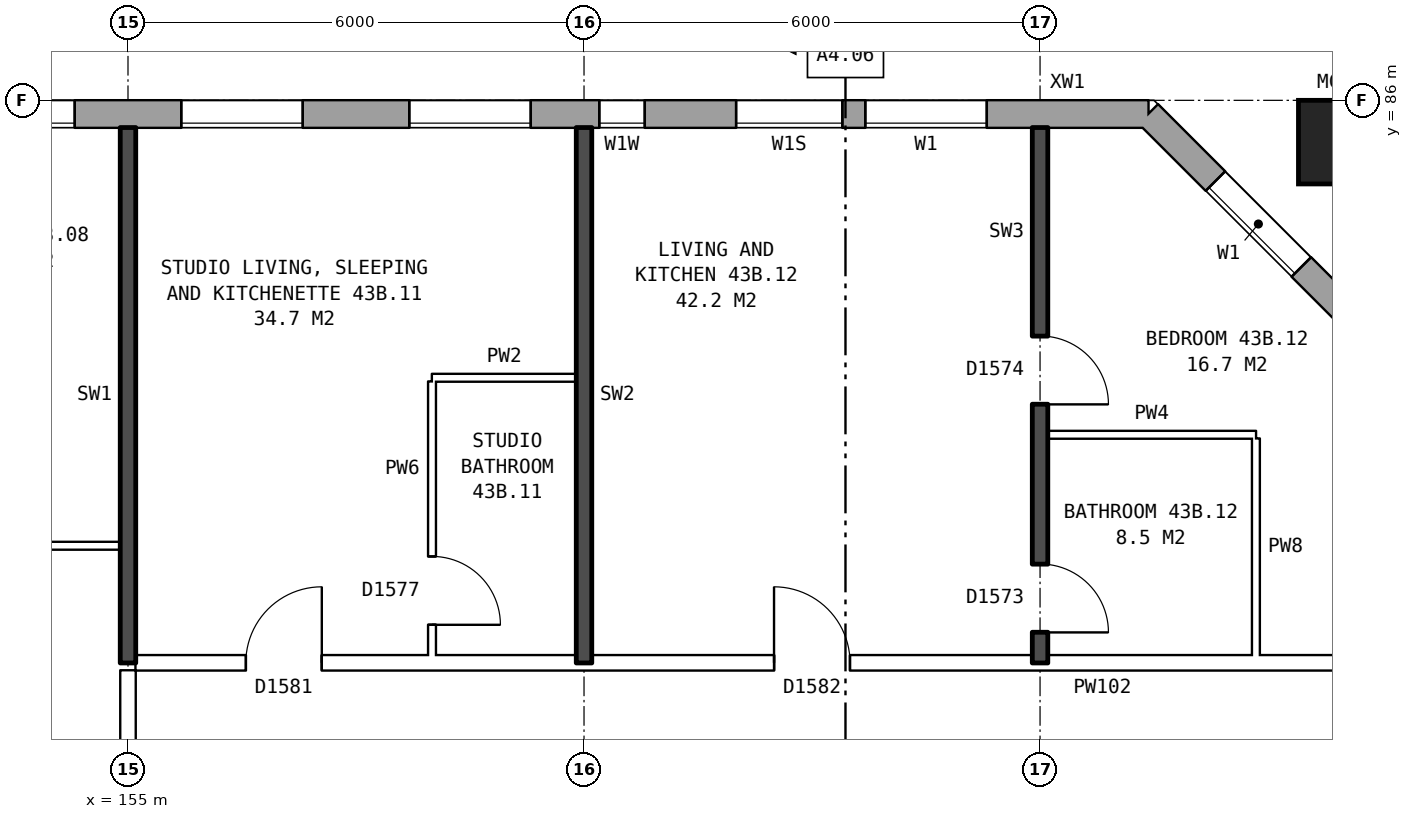
"""IFC4 building model, lengths in metres.
Left out: names, types, materials, properties, quantities, classifications, styles, units other than length and angle.
Written with IfcOpenShell. Run it as: python <this file> out.ifc"""

import sys

from ifc_helpers import new_model, si_unit, direction, frame, frame_2d, origin, origin_2d, place, context, subcontext, project, spatial, rectangle, hollow_rectangle, extrude, element, fill, save


model = new_model("IFC4")
c1 = context("Model", 3, precision=1e-05, world=origin(), true_north=direction((0.0, 1.0)))
c2 = subcontext(c1, "Body", "Model", "MODEL_VIEW")
j1 = project(units=[si_unit("LENGTHUNIT", "METRE"), si_unit("PLANEANGLEUNIT", "RADIAN")], contexts=[c1])
p1 = place(None, origin())
s1 = spatial("IfcSite", under=j1, at=p1, CompositionType="ELEMENT")
p2 = place(p1, origin())
s2 = spatial("IfcBuilding", under=s1, at=p2, CompositionType="ELEMENT")
p3 = place(p2, frame((0.0, 0.0, 154.7)))
s3 = spatial("IfcBuildingStorey", under=s2, at=p3, CompositionType="ELEMENT", Elevation=154.7)
p4 = place(p3, frame((170.95, 85.45, 0.0), z_axis=(0.0, 0.0, 1.0), x_axis=(1.0, 0.0, 0.0)))
e1 = element("IfcColumn", 1, at=p4, inside=s3, PredefinedType="COLUMN", context=c2, shape_type="SweptSolid", body=[
    extrude(hollow_rectangle(XDim=1.1, YDim=1.1, WallThickness=0.06, at=origin_2d()), origin(), (0.0, 0.0, 1.0), 3.1),
])
p5 = place(p3, frame((171.32, 82.925, 0.0), z_axis=(0.0, 0.0, 1.0), x_axis=(-0.707106781187, 0.707106781187, 0.0)))
e2 = element("IfcWall", 2, at=p5, inside=s3, PredefinedType="STANDARD", context=c2, shape_type="SweptSolid", body=[
    extrude(rectangle(XDim=4.094, YDim=0.36, at=frame_2d((2.047, 0.0))), origin(), (0.0, 0.0, 1.0), 2.85),
])
p6 = place(p5, frame((1.247, 0.0, 0.8)))
e3 = element("IfcOpeningElement", 3, at=p6, cuts=e2, PredefinedType="OPENING", context=c2, shape_type="SweptSolid", body=[
    extrude(rectangle(XDim=1.6, YDim=1.8, at=frame_2d((0.8, 0.9))), frame((0.0, 0.19, 0.0), z_axis=(0.0, -1.0, 0.0), x_axis=(1.0, 0.0, 0.0)), (0.0, 0.0, 1.0), 0.38),
])
p7 = place(p3, frame((168.425, 85.82, 0.0), z_axis=(0.0, 0.0, 1.0), x_axis=(-1.0, 0.0, 0.0)))
e4 = element("IfcWall", 4, at=p7, inside=s3, PredefinedType="STANDARD", context=c2, shape_type="SweptSolid", body=[
    extrude(rectangle(XDim=34.351, YDim=0.36, at=frame_2d((17.175, 0.0))), origin(), (0.0, 0.0, 1.0), 2.85),
])
p8 = place(p7, frame((2.125, 0.0, 0.8)))
e5 = element("IfcOpeningElement", 5, at=p8, cuts=e4, PredefinedType="OPENING", context=c2, shape_type="SweptSolid", body=[
    extrude(rectangle(XDim=1.6, YDim=1.8, at=frame_2d((0.8, 0.9))), frame((0.0, 0.19, 0.0), z_axis=(0.0, -1.0, 0.0), x_axis=(1.0, 0.0, 0.0)), (0.0, 0.0, 1.0), 0.38),
])
p9 = place(p7, frame((4.025, 0.0, 1.7)))
e6 = element("IfcOpeningElement", 6, at=p9, cuts=e4, PredefinedType="OPENING", context=c2, shape_type="SweptSolid", body=[
    extrude(rectangle(XDim=1.4, YDim=0.9, at=frame_2d((0.7, 0.45))), frame((0.0, 0.19, 0.0), z_axis=(0.0, -1.0, 0.0), x_axis=(1.0, 0.0, 0.0)), (0.0, 0.0, 1.0), 0.38),
])
p10 = place(p7, frame((8.125, 0.0, 0.8)))
e7 = element("IfcOpeningElement", 7, at=p10, cuts=e4, PredefinedType="OPENING", context=c2, shape_type="SweptSolid", body=[
    extrude(rectangle(XDim=1.6, YDim=1.8, at=frame_2d((0.8, 0.9))), frame((0.0, 0.19, 0.0), z_axis=(0.0, -1.0, 0.0), x_axis=(1.0, 0.0, 0.0)), (0.0, 0.0, 1.0), 0.38),
])
p11 = place(p7, frame((11.125, 0.0, 0.8)))
e8 = element("IfcOpeningElement", 8, at=p11, cuts=e4, PredefinedType="OPENING", context=c2, shape_type="SweptSolid", body=[
    extrude(rectangle(XDim=1.6, YDim=1.8, at=frame_2d((0.8, 0.9))), frame((0.0, 0.19, 0.0), z_axis=(0.0, -1.0, 0.0), x_axis=(1.0, 0.0, 0.0)), (0.0, 0.0, 1.0), 0.38),
])
p12 = place(p7, frame((14.125, 0.0, 0.8)))
e9 = element("IfcOpeningElement", 9, at=p12, cuts=e4, PredefinedType="OPENING", context=c2, shape_type="SweptSolid", body=[
    extrude(rectangle(XDim=1.6, YDim=1.8, at=frame_2d((0.8, 0.9))), frame((0.0, 0.19, 0.0), z_axis=(0.0, -1.0, 0.0), x_axis=(1.0, 0.0, 0.0)), (0.0, 0.0, 1.0), 0.38),
])
p13 = place(p7, frame((17.125, 0.0, 0.8)))
e10 = element("IfcOpeningElement", 10, at=p13, cuts=e4, PredefinedType="OPENING", context=c2, shape_type="SweptSolid", body=[
    extrude(rectangle(XDim=1.6, YDim=1.8, at=frame_2d((0.8, 0.9))), frame((0.0, 0.19, 0.0), z_axis=(0.0, -1.0, 0.0), x_axis=(1.0, 0.0, 0.0)), (0.0, 0.0, 1.0), 0.38),
])
p14 = place(p7, frame((20.125, 0.0, 0.8)))
e11 = element("IfcOpeningElement", 11, at=p14, cuts=e4, PredefinedType="OPENING", context=c2, shape_type="SweptSolid", body=[
    extrude(rectangle(XDim=1.6, YDim=1.8, at=frame_2d((0.8, 0.9))), frame((0.0, 0.19, 0.0), z_axis=(0.0, -1.0, 0.0), x_axis=(1.0, 0.0, 0.0)), (0.0, 0.0, 1.0), 0.38),
])
p15 = place(p7, frame((23.125, 0.0, 0.8)))
e12 = element("IfcOpeningElement", 12, at=p15, cuts=e4, PredefinedType="OPENING", context=c2, shape_type="SweptSolid", body=[
    extrude(rectangle(XDim=1.6, YDim=1.8, at=frame_2d((0.8, 0.9))), frame((0.0, 0.19, 0.0), z_axis=(0.0, -1.0, 0.0), x_axis=(1.0, 0.0, 0.0)), (0.0, 0.0, 1.0), 0.38),
])
p16 = place(p7, frame((25.625, 0.0, 0.8)))
e13 = element("IfcOpeningElement", 13, at=p16, cuts=e4, PredefinedType="OPENING", context=c2, shape_type="SweptSolid", body=[
    extrude(rectangle(XDim=1.0, YDim=1.8, at=frame_2d((0.5, 0.9))), frame((0.0, 0.19, 0.0), z_axis=(0.0, -1.0, 0.0), x_axis=(1.0, 0.0, 0.0)), (0.0, 0.0, 1.0), 0.38),
])
p17 = place(p7, frame((26.925, 0.0, 0.8)))
e14 = element("IfcOpeningElement", 14, at=p17, cuts=e4, PredefinedType="OPENING", context=c2, shape_type="SweptSolid", body=[
    extrude(rectangle(XDim=0.8, YDim=0.9, at=frame_2d((0.4, 0.45))), frame((0.0, 0.19, 0.0), z_axis=(0.0, -1.0, 0.0), x_axis=(1.0, 0.0, 0.0)), (0.0, 0.0, 1.0), 0.38),
])
p18 = place(p7, frame((32.125, 0.0, 0.8)))
e15 = element("IfcOpeningElement", 15, at=p18, cuts=e4, PredefinedType="OPENING", context=c2, shape_type="SweptSolid", body=[
    extrude(rectangle(XDim=1.6, YDim=1.8, at=frame_2d((0.8, 0.9))), frame((0.0, 0.19, 0.0), z_axis=(0.0, -1.0, 0.0), x_axis=(1.0, 0.0, 0.0)), (0.0, 0.0, 1.0), 0.38),
])
p19 = place(p7, frame((6.625, 0.0, 0.8)))
e16 = element("IfcOpeningElement", 16, at=p19, cuts=e4, PredefinedType="OPENING", context=c2, shape_type="SweptSolid", body=[
    extrude(rectangle(XDim=0.6, YDim=0.9, at=frame_2d((0.3, 0.45))), frame((0.0, 0.19, 0.0), z_axis=(0.0, -1.0, 0.0), x_axis=(1.0, 0.0, 0.0)), (0.0, 0.0, 1.0), 0.38),
])
p20 = place(p7, frame((28.925, 0.0, 1.7)))
e17 = element("IfcOpeningElement", 17, at=p20, cuts=e4, PredefinedType="OPENING", context=c2, shape_type="SweptSolid", body=[
    extrude(rectangle(XDim=0.8, YDim=0.9, at=frame_2d((0.4, 0.45))), frame((0.0, 0.19, 0.0), z_axis=(0.0, -1.0, 0.0), x_axis=(1.0, 0.0, 0.0)), (0.0, 0.0, 1.0), 0.38),
])
p21 = place(p7, frame((30.025, 0.0, 0.8)))
e18 = element("IfcOpeningElement", 18, at=p21, cuts=e4, PredefinedType="OPENING", context=c2, shape_type="SweptSolid", body=[
    extrude(rectangle(XDim=1.2, YDim=1.8, at=frame_2d((0.6, 0.9))), frame((0.0, 0.19, 0.0), z_axis=(0.0, -1.0, 0.0), x_axis=(1.0, 0.0, 0.0)), (0.0, 0.0, 1.0), 0.38),
])
p22 = place(p3, frame((155.1, 78.6, 0.0), z_axis=(0.0, 0.0, 1.0), x_axis=(1.0, 0.0, 0.0)))
e19 = element("IfcWall", 19, at=p22, inside=s3, PredefinedType="PARTITIONING", context=c2, shape_type="SweptSolid", body=[
    extrude(rectangle(XDim=16.04, YDim=0.2, at=frame_2d((8.02, 0.0))), origin(), (0.0, 0.0, 1.0), 2.85),
])
p23 = place(p22, frame((1.45, 0.0, 0.0)))
e20 = element("IfcOpeningElement", 20, at=p23, cuts=e19, PredefinedType="OPENING", context=c2, shape_type="SweptSolid", body=[
    extrude(rectangle(XDim=1.0, YDim=2.1, at=frame_2d((0.5, 1.05))), frame((0.0, 0.11, 0.0), z_axis=(0.0, -1.0, 0.0), x_axis=(1.0, 0.0, 0.0)), (0.0, 0.0, 1.0), 0.22),
])
p24 = place(p22, frame((8.4, 0.0, 0.0)))
e21 = element("IfcOpeningElement", 21, at=p24, cuts=e19, PredefinedType="OPENING", context=c2, shape_type="SweptSolid", body=[
    extrude(rectangle(XDim=1.0, YDim=2.1, at=frame_2d((0.5, 1.05))), frame((0.0, 0.11, 0.0), z_axis=(0.0, -1.0, 0.0), x_axis=(1.0, 0.0, 0.0)), (0.0, 0.0, 1.0), 0.22),
])
p25 = place(p3, frame((152.0, 80.14, 0.0), z_axis=(0.0, 0.0, 1.0), x_axis=(1.0, 0.0, 0.0)))
e22 = element("IfcWall", 22, at=p25, inside=s3, PredefinedType="PARTITIONING", context=c2, shape_type="SweptSolid", body=[
    extrude(rectangle(XDim=2.9, YDim=0.1, at=frame_2d((1.45, 0.0))), origin(), (0.0, 0.0, 1.0), 2.85),
])
p26 = place(p25, frame((1.0, 0.0, 0.0)))
e23 = element("IfcOpeningElement", 23, at=p26, cuts=e22, PredefinedType="OPENING", context=c2, shape_type="SweptSolid", body=[
    extrude(rectangle(XDim=0.9, YDim=2.1, at=frame_2d((0.45, 1.05))), frame((0.0, 0.06, 0.0), z_axis=(0.0, -1.0, 0.0), x_axis=(1.0, 0.0, 0.0)), (0.0, 0.0, 1.0), 0.12),
])
p27 = place(p3, frame((167.1, 81.6, 0.0), z_axis=(0.0, 0.0, 1.0), x_axis=(1.0, 0.0, 0.0)))
e24 = element("IfcWall", 24, at=p27, inside=s3, PredefinedType="PARTITIONING", context=c2, shape_type="SweptSolid", body=[
    extrude(rectangle(XDim=2.74, YDim=0.1, at=frame_2d((1.37, 0.0))), origin(), (0.0, 0.0, 1.0), 2.85),
])
p28 = place(p3, frame((159.0, 82.35, 0.0), z_axis=(0.0, 0.0, 1.0), x_axis=(1.0, 0.0, 0.0)))
e25 = element("IfcWall", 25, at=p28, inside=s3, PredefinedType="PARTITIONING", context=c2, shape_type="SweptSolid", body=[
    extrude(rectangle(XDim=1.9, YDim=0.1, at=frame_2d((0.95, 0.0))), origin(), (0.0, 0.0, 1.0), 2.85),
])
p29 = place(p3, frame((155.0, 76.3, 0.0), z_axis=(0.0, 0.0, 1.0), x_axis=(0.0, 1.0, 0.0)))
e26 = element("IfcWall", 26, at=p29, inside=s3, PredefinedType="PARTITIONING", context=c2, shape_type="SweptSolid", body=[
    extrude(rectangle(XDim=2.2, YDim=0.2, at=frame_2d((1.1, 0.0))), origin(), (0.0, 0.0, 1.0), 2.85),
])
p30 = place(p3, frame((155.0, 78.6, 0.0), z_axis=(0.0, 0.0, 1.0), x_axis=(0.0, 1.0, 0.0)))
e27 = element("IfcWall", 27, at=p30, inside=s3, PredefinedType="SOLIDWALL", context=c2, shape_type="SweptSolid", body=[
    extrude(rectangle(XDim=7.04, YDim=0.2, at=frame_2d((3.52, 0.0))), origin(), (0.0, 0.0, 1.0), 2.85),
])
p31 = place(p3, frame((159.0, 78.7, 0.0), z_axis=(0.0, 0.0, 1.0), x_axis=(0.0, 1.0, 0.0)))
e28 = element("IfcWall", 28, at=p31, inside=s3, PredefinedType="PARTITIONING", context=c2, shape_type="SweptSolid", body=[
    extrude(rectangle(XDim=3.6, YDim=0.1, at=frame_2d((1.8, 0.0))), origin(), (0.0, 0.0, 1.0), 2.85),
])
p32 = place(p31, frame((0.4, 0.0, 0.0)))
e29 = element("IfcOpeningElement", 29, at=p32, cuts=e28, PredefinedType="OPENING", context=c2, shape_type="SweptSolid", body=[
    extrude(rectangle(XDim=0.9, YDim=2.1, at=frame_2d((0.45, 1.05))), frame((0.0, 0.06, 0.0), z_axis=(0.0, -1.0, 0.0), x_axis=(1.0, 0.0, 0.0)), (0.0, 0.0, 1.0), 0.12),
])
p33 = place(p3, frame((161.0, 78.6, 0.0), z_axis=(0.0, 0.0, 1.0), x_axis=(0.0, 1.0, 0.0)))
e30 = element("IfcWall", 30, at=p33, inside=s3, PredefinedType="SOLIDWALL", context=c2, shape_type="SweptSolid", body=[
    extrude(rectangle(XDim=7.04, YDim=0.2, at=frame_2d((3.52, 0.0))), origin(), (0.0, 0.0, 1.0), 2.85),
])
p34 = place(p3, frame((167.0, 78.6, 0.0), z_axis=(0.0, 0.0, 1.0), x_axis=(0.0, 1.0, 0.0)))
e31 = element("IfcWall", 31, at=p34, inside=s3, PredefinedType="SOLIDWALL", context=c2, shape_type="SweptSolid", body=[
    extrude(rectangle(XDim=7.04, YDim=0.2, at=frame_2d((3.52, 0.0))), origin(), (0.0, 0.0, 1.0), 2.85),
])
p35 = place(p34, frame((3.4, 0.0, 0.0)))
e32 = element("IfcOpeningElement", 32, at=p35, cuts=e31, PredefinedType="OPENING", context=c2, shape_type="SweptSolid", body=[
    extrude(rectangle(XDim=0.9, YDim=2.1, at=frame_2d((0.45, 1.05))), frame((0.0, 0.11, 0.0), z_axis=(0.0, -1.0, 0.0), x_axis=(1.0, 0.0, 0.0)), (0.0, 0.0, 1.0), 0.22),
])
p36 = place(p34, frame((0.4, 0.0, 0.0)))
e33 = element("IfcOpeningElement", 33, at=p36, cuts=e31, PredefinedType="OPENING", context=c2, shape_type="SweptSolid", body=[
    extrude(rectangle(XDim=0.9, YDim=2.1, at=frame_2d((0.45, 1.05))), frame((0.0, 0.11, 0.0), z_axis=(0.0, -1.0, 0.0), x_axis=(1.0, 0.0, 0.0)), (0.0, 0.0, 1.0), 0.22),
])
p37 = place(p3, frame((169.84, 78.7, 0.0), z_axis=(0.0, 0.0, 1.0), x_axis=(0.0, 1.0, 0.0)))
e34 = element("IfcWall", 34, at=p37, inside=s3, PredefinedType="PARTITIONING", context=c2, shape_type="SweptSolid", body=[
    extrude(rectangle(XDim=2.85, YDim=0.1, at=frame_2d((1.425, 0.0))), origin(), (0.0, 0.0, 1.0), 2.85),
])
p38 = place(p6, origin())
e35 = element("IfcWindow", 35, at=p38, inside=s3, PartitioningType="SINGLE_PANEL", PredefinedType="WINDOW", context=c2, shape_type="SweptSolid", body=[
    extrude(rectangle(XDim=1.6, YDim=1.8, at=frame_2d((0.8, 0.9))), frame((0.0, 0.15, 0.0), z_axis=(0.0, -1.0, 0.0), x_axis=(1.0, 0.0, 0.0)), (0.0, 0.0, 1.0), 0.06),
])
fill(e3, e35)
p39 = place(p8, origin())
e36 = element("IfcWindow", 36, at=p39, inside=s3, PartitioningType="SINGLE_PANEL", PredefinedType="WINDOW", context=c2, shape_type="SweptSolid", body=[
    extrude(rectangle(XDim=1.6, YDim=1.8, at=frame_2d((0.8, 0.9))), frame((0.0, 0.15, 0.0), z_axis=(0.0, -1.0, 0.0), x_axis=(1.0, 0.0, 0.0)), (0.0, 0.0, 1.0), 0.06),
])
fill(e5, e36)
p40 = place(p9, origin())
e37 = element("IfcWindow", 37, at=p40, inside=s3, PartitioningType="SINGLE_PANEL", PredefinedType="WINDOW", context=c2, shape_type="SweptSolid", body=[
    extrude(rectangle(XDim=1.4, YDim=0.9, at=frame_2d((0.7, 0.45))), frame((0.0, 0.15, 0.0), z_axis=(0.0, -1.0, 0.0), x_axis=(1.0, 0.0, 0.0)), (0.0, 0.0, 1.0), 0.06),
])
fill(e6, e37)
p41 = place(p10, origin())
e38 = element("IfcWindow", 38, at=p41, inside=s3, PartitioningType="SINGLE_PANEL", PredefinedType="WINDOW", context=c2, shape_type="SweptSolid", body=[
    extrude(rectangle(XDim=1.6, YDim=1.8, at=frame_2d((0.8, 0.9))), frame((0.0, 0.15, 0.0), z_axis=(0.0, -1.0, 0.0), x_axis=(1.0, 0.0, 0.0)), (0.0, 0.0, 1.0), 0.06),
])
fill(e7, e38)
p42 = place(p11, origin())
e39 = element("IfcWindow", 39, at=p42, inside=s3, PartitioningType="SINGLE_PANEL", PredefinedType="WINDOW", context=c2, shape_type="SweptSolid", body=[
    extrude(rectangle(XDim=1.6, YDim=1.8, at=frame_2d((0.8, 0.9))), frame((0.0, 0.15, 0.0), z_axis=(0.0, -1.0, 0.0), x_axis=(1.0, 0.0, 0.0)), (0.0, 0.0, 1.0), 0.06),
])
fill(e8, e39)
p43 = place(p12, origin())
e40 = element("IfcWindow", 40, at=p43, inside=s3, PartitioningType="SINGLE_PANEL", PredefinedType="WINDOW", context=c2, shape_type="SweptSolid", body=[
    extrude(rectangle(XDim=1.6, YDim=1.8, at=frame_2d((0.8, 0.9))), frame((0.0, 0.15, 0.0), z_axis=(0.0, -1.0, 0.0), x_axis=(1.0, 0.0, 0.0)), (0.0, 0.0, 1.0), 0.06),
])
fill(e9, e40)
p44 = place(p23, origin())
e41 = element("IfcDoor", 41, at=p44, inside=s3, OperationType="SINGLE_SWING_RIGHT", PredefinedType="DOOR", context=c2, shape_type="SweptSolid", body=[
    extrude(rectangle(XDim=1.0, YDim=2.1, at=frame_2d((0.5, 1.05))), frame((0.0, 0.025, 0.0), z_axis=(0.0, -1.0, 0.0), x_axis=(1.0, 0.0, 0.0)), (0.0, 0.0, 1.0), 0.05),
])
fill(e20, e41)
p45 = place(p32, frame((0.9, 0.0, 0.0), z_axis=(0.0, 0.0, 1.0), x_axis=(-1.0, 0.0, 0.0)))
e42 = element("IfcDoor", 42, at=p45, inside=s3, OperationType="SINGLE_SWING_RIGHT", PredefinedType="DOOR", context=c2, shape_type="SweptSolid", body=[
    extrude(rectangle(XDim=0.9, YDim=2.1, at=frame_2d((0.45, 1.05))), frame((0.0, 0.025, 0.0), z_axis=(0.0, -1.0, 0.0), x_axis=(1.0, 0.0, 0.0)), (0.0, 0.0, 1.0), 0.05),
])
fill(e29, e42)
p46 = place(p35, frame((0.9, 0.0, 0.0), z_axis=(0.0, 0.0, 1.0), x_axis=(-1.0, 0.0, 0.0)))
e43 = element("IfcDoor", 43, at=p46, inside=s3, OperationType="SINGLE_SWING_RIGHT", PredefinedType="DOOR", context=c2, shape_type="SweptSolid", body=[
    extrude(rectangle(XDim=0.9, YDim=2.1, at=frame_2d((0.45, 1.05))), frame((0.0, 0.025, 0.0), z_axis=(0.0, -1.0, 0.0), x_axis=(1.0, 0.0, 0.0)), (0.0, 0.0, 1.0), 0.05),
])
fill(e32, e43)
p47 = place(p24, origin())
e44 = element("IfcDoor", 44, at=p47, inside=s3, OperationType="SINGLE_SWING_LEFT", PredefinedType="DOOR", context=c2, shape_type="SweptSolid", body=[
    extrude(rectangle(XDim=1.0, YDim=2.1, at=frame_2d((0.5, 1.05))), frame((0.0, 0.025, 0.0), z_axis=(0.0, -1.0, 0.0), x_axis=(1.0, 0.0, 0.0)), (0.0, 0.0, 1.0), 0.05),
])
fill(e21, e44)
p48 = place(p36, frame((0.9, 0.0, 0.0), z_axis=(0.0, 0.0, 1.0), x_axis=(-1.0, 0.0, 0.0)))
e45 = element("IfcDoor", 45, at=p48, inside=s3, OperationType="SINGLE_SWING_RIGHT", PredefinedType="DOOR", context=c2, shape_type="SweptSolid", body=[
    extrude(rectangle(XDim=0.9, YDim=2.1, at=frame_2d((0.45, 1.05))), frame((0.0, 0.025, 0.0), z_axis=(0.0, -1.0, 0.0), x_axis=(1.0, 0.0, 0.0)), (0.0, 0.0, 1.0), 0.05),
])
fill(e33, e45)
p49 = place(p19, origin())
e46 = element("IfcWindow", 46, at=p49, inside=s3, PartitioningType="SINGLE_PANEL", PredefinedType="WINDOW", context=c2, shape_type="SweptSolid", body=[
    extrude(rectangle(XDim=0.6, YDim=0.9, at=frame_2d((0.3, 0.45))), frame((0.0, 0.15, 0.0), z_axis=(0.0, -1.0, 0.0), x_axis=(1.0, 0.0, 0.0)), (0.0, 0.0, 1.0), 0.06),
])
fill(e16, e46)
save(model, sys.argv[1])
